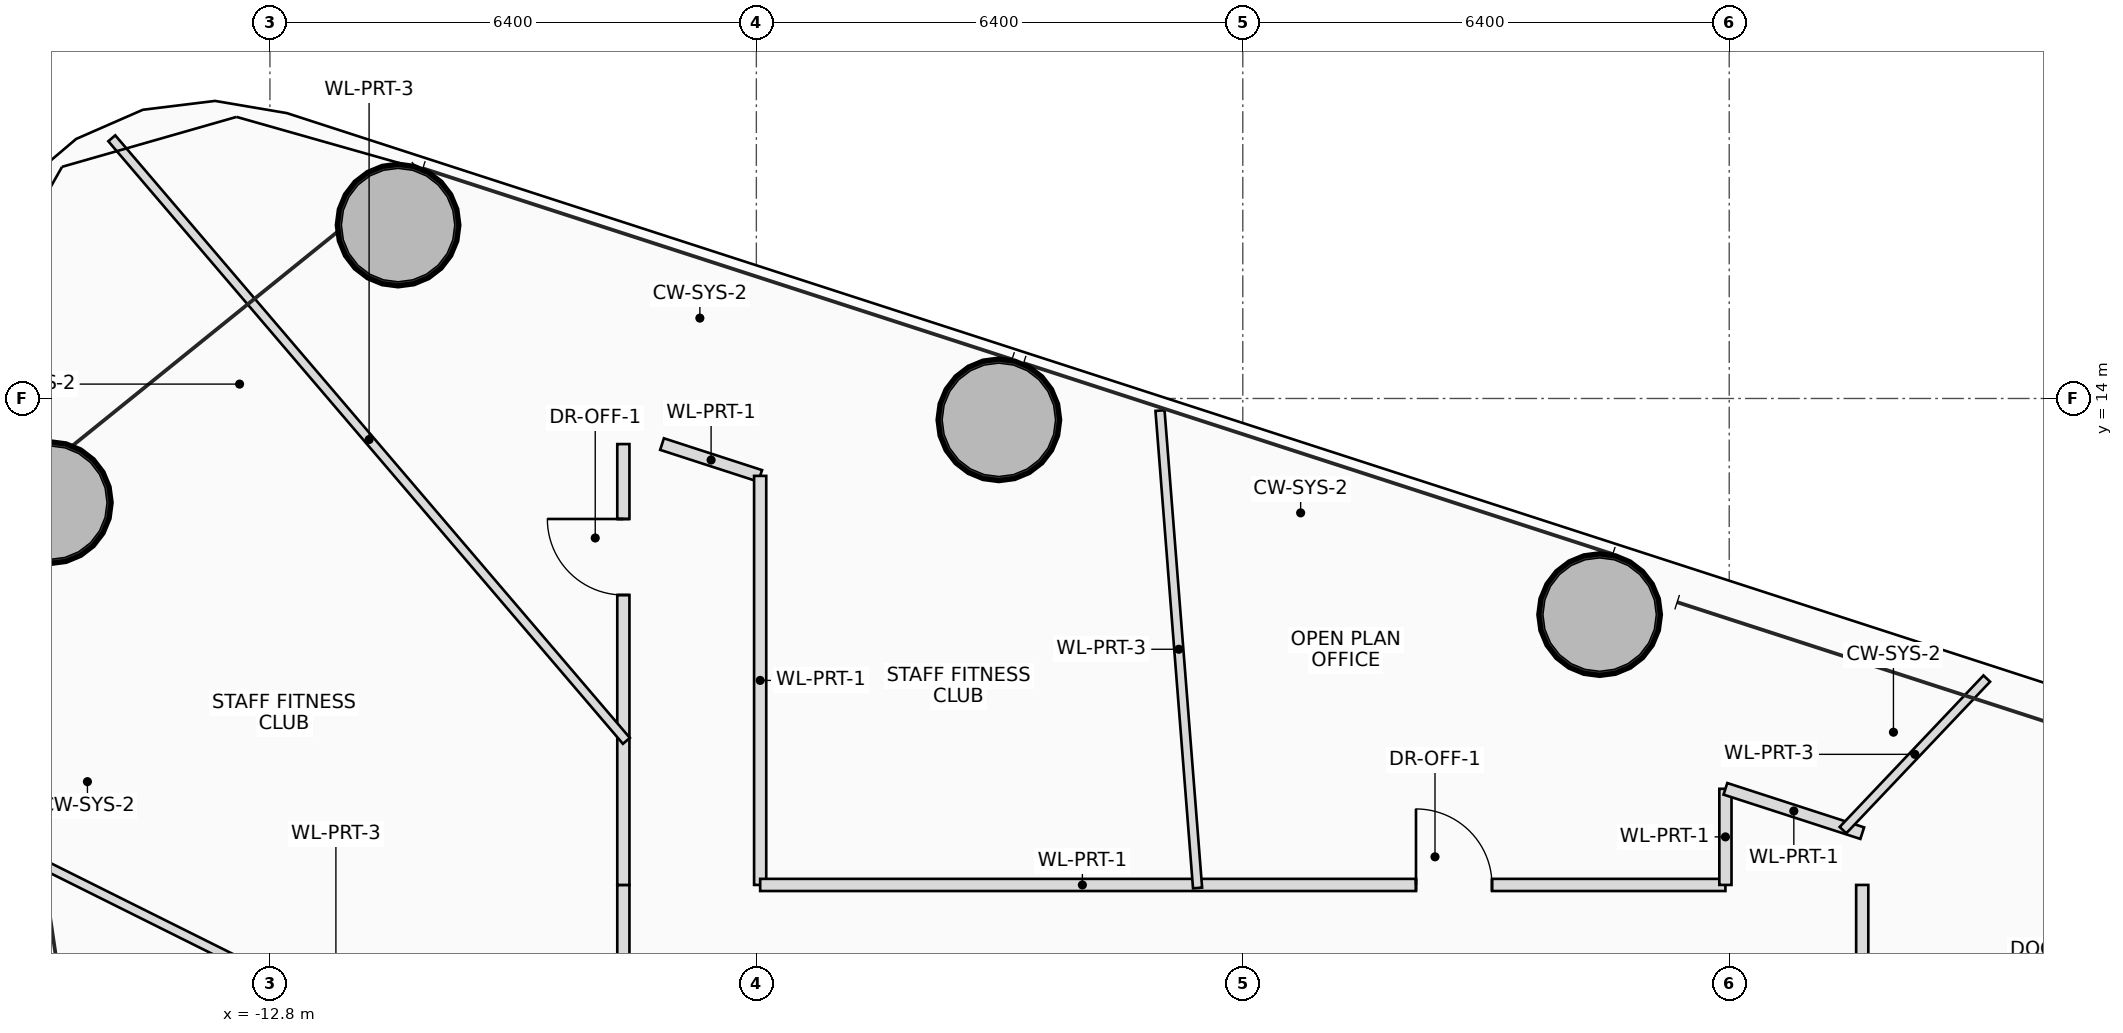
"""IFC4 building model, lengths in metres.
Left out: names, types, materials, properties, quantities, classifications, styles, units other than length and angle.
Written with IfcOpenShell. Run it as: python <this file> out.ifc"""

import sys

from ifc_helpers import new_model, si_unit, direction, frame, frame_2d, origin, origin_2d, place, context, subcontext, project, spatial, rectangle, hollow_circle, extrude, source, transform, mapped, element, fill, save


model = new_model("IFC4")
c1 = context("Model", 3, precision=1e-05, world=origin(), true_north=direction((0.0, 1.0)))
c2 = subcontext(c1, "Body", "Model", "MODEL_VIEW")
j1 = project(units=[si_unit("LENGTHUNIT", "METRE"), si_unit("PLANEANGLEUNIT", "RADIAN")], contexts=[c1])
p1 = place(None, origin())
s1 = spatial("IfcSite", under=j1, at=p1, CompositionType="ELEMENT")
p2 = place(p1, origin())
s2 = spatial("IfcBuilding", under=s1, at=p2, CompositionType="ELEMENT")
p3 = place(p2, frame((0.0, 0.0, 81.05)))
s3 = spatial("IfcBuildingStorey", under=s2, at=p3, CompositionType="ELEMENT", Elevation=81.05)
m1 = source(origin(), c2, "Body", "SweptSolid", [
    extrude(hollow_circle(Radius=0.8, WallThickness=0.055, at=origin_2d()), origin(), (0.0, 0.0, 1.0), 3.75),
])
for number, where, z_axis, x_axis in (
    (1, (4.695, 11.157, 0.0), (0.0, 0.0, 1.0), (1.0, 0.0, 0.0)),
    (2, (-3.21, 13.719, 0.0), (0.0, 0.0, 1.0), (1.0, 0.0, 0.0)),
    (3, (-11.114, 16.281, 0.0), (0.0, 0.0, 1.0), (1.0, 0.0, 0.0)),
    (4, (-15.689, 12.629, 0.0), (0.0, 0.0, 1.0), (1.0, 0.0, 0.0)),
):
    element("IfcColumn", number, at=place(p3, frame(where, z_axis=z_axis, x_axis=x_axis)), inside=s3, PredefinedType="COLUMN", context=c2, shape_type="MappedRepresentation", body=[
        mapped(m1, transform((0.0, 0.0, 0.0), scale=1.0)),
    ])
p4 = place(p3, frame((-8.15, -7.6, 0.0), z_axis=(0.0, 0.0, 1.0), x_axis=(0.0, 1.0, 0.0)))
e5 = element("IfcWall", 5, at=p4, inside=s3, PredefinedType="PARTITIONING", context=c2, shape_type="SweptSolid", body=[
    extrude(rectangle(XDim=15.2, YDim=0.16, at=frame_2d((7.6, 0.0))), origin(), (0.0, 0.0, 1.0), 2.815),
])
p5 = place(p4, frame((1.853, 0.0, 0.0)))
e6 = element("IfcOpeningElement", 6, at=p5, cuts=e5, PredefinedType="OPENING", context=c2, shape_type="SweptSolid", body=[
    extrude(rectangle(XDim=1.0, YDim=2.25, at=frame_2d((0.5, 1.125))), frame((0.0, 0.09, 0.0), z_axis=(0.0, -1.0, 0.0), x_axis=(1.0, 0.0, 0.0)), (0.0, 0.0, 1.0), 0.18),
])
p6 = place(p4, frame((7.613, 0.0, 0.0)))
e7 = element("IfcOpeningElement", 7, at=p6, cuts=e5, PredefinedType="OPENING", context=c2, shape_type="SweptSolid", body=[
    extrude(rectangle(XDim=1.0, YDim=2.25, at=frame_2d((0.5, 1.125))), frame((0.0, 0.09, 0.0), z_axis=(0.0, -1.0, 0.0), x_axis=(1.0, 0.0, 0.0)), (0.0, 0.0, 1.0), 0.18),
])
p7 = place(p4, frame((12.862, 0.0, 0.0)))
e8 = element("IfcOpeningElement", 8, at=p7, cuts=e5, PredefinedType="OPENING", context=c2, shape_type="SweptSolid", body=[
    extrude(rectangle(XDim=1.0, YDim=2.25, at=frame_2d((0.5, 1.125))), frame((0.0, 0.09, 0.0), z_axis=(0.0, -1.0, 0.0), x_axis=(1.0, 0.0, 0.0)), (0.0, 0.0, 1.0), 0.18),
])
p8 = place(p3, frame((-8.15, 7.6, 0.0), z_axis=(0.0, 0.0, 1.0), x_axis=(0.0, 1.0, 0.0)))
e9 = element("IfcWall", 9, at=p8, inside=s3, PredefinedType="PARTITIONING", context=c2, shape_type="SweptSolid", body=[
    extrude(rectangle(XDim=5.8, YDim=0.16, at=frame_2d((2.9, 0.0))), origin(), (0.0, 0.0, 1.0), 2.815),
])
p9 = place(p8, frame((3.815, 0.0, 0.0)))
e10 = element("IfcOpeningElement", 10, at=p9, cuts=e9, PredefinedType="OPENING", context=c2, shape_type="SweptSolid", body=[
    extrude(rectangle(XDim=1.0, YDim=2.25, at=frame_2d((0.5, 1.125))), frame((0.0, 0.09, 0.0), z_axis=(0.0, -1.0, 0.0), x_axis=(1.0, 0.0, 0.0)), (0.0, 0.0, 1.0), 0.18),
])
p10 = place(p3, frame((-7.641, 13.4, 0.0), z_axis=(0.0, 0.0, 1.0), x_axis=(0.951277022007, -0.308337521884, 0.0)))
e11 = element("IfcWall", 11, at=p10, inside=s3, PredefinedType="PARTITIONING", context=c2, shape_type="SweptSolid", body=[
    extrude(rectangle(XDim=1.357, YDim=0.16, at=frame_2d((0.679, 0.0))), origin(), (0.0, 0.0, 1.0), 3.51),
])
p11 = place(p3, frame((-6.35, 12.981, 0.0), z_axis=(0.0, 0.0, 1.0), x_axis=(0.0, -1.0, 0.0)))
e12 = element("IfcWall", 12, at=p11, inside=s3, PredefinedType="PARTITIONING", context=c2, shape_type="SweptSolid", body=[
    extrude(rectangle(XDim=5.381, YDim=0.16, at=frame_2d((2.691, 0.0))), origin(), (0.0, 0.0, 1.0), 3.015),
])
p12 = place(p3, frame((-6.35, 7.6, 0.0), z_axis=(0.0, 0.0, 1.0), x_axis=(1.0, 0.0, 0.0)))
e13 = element("IfcWall", 13, at=p12, inside=s3, PredefinedType="PARTITIONING", context=c2, shape_type="SweptSolid", body=[
    extrude(rectangle(XDim=12.7, YDim=0.16, at=frame_2d((6.35, 0.0))), origin(), (0.0, 0.0, 1.0), 2.815),
])
p13 = place(p12, frame((8.629, 0.0, 0.0)))
e14 = element("IfcOpeningElement", 14, at=p13, cuts=e13, PredefinedType="OPENING", context=c2, shape_type="SweptSolid", body=[
    extrude(rectangle(XDim=1.0, YDim=2.25, at=frame_2d((0.5, 1.125))), frame((0.0, 0.09, 0.0), z_axis=(0.0, -1.0, 0.0), x_axis=(1.0, 0.0, 0.0)), (0.0, 0.0, 1.0), 0.18),
])
p14 = place(p3, frame((6.35, 7.6, 0.0), z_axis=(0.0, 0.0, 1.0), x_axis=(0.0, 1.0, 0.0)))
e15 = element("IfcWall", 15, at=p14, inside=s3, PredefinedType="PARTITIONING", context=c2, shape_type="SweptSolid", body=[
    extrude(rectangle(XDim=1.265, YDim=0.16, at=frame_2d((0.632, 0.0))), origin(), (0.0, 0.0, 1.0), 3.015),
])
p15 = place(p3, frame((6.35, 8.865, 0.0), z_axis=(0.0, 0.0, 1.0), x_axis=(0.951257609277, -0.30839740724, 0.0)))
e16 = element("IfcWall", 16, at=p15, inside=s3, PredefinedType="PARTITIONING", context=c2, shape_type="SweptSolid", body=[
    extrude(rectangle(XDim=1.892, YDim=0.16, at=frame_2d((0.946, 0.0))), origin(), (0.0, 0.0, 1.0), 3.165),
])
p16 = place(p3, frame((8.15, 7.6, 0.0), z_axis=(0.0, 0.0, 1.0), x_axis=(0.0, -1.0, 0.0)))
e17 = element("IfcWall", 17, at=p16, inside=s3, PredefinedType="PARTITIONING", context=c2, shape_type="SweptSolid", body=[
    extrude(rectangle(XDim=7.58, YDim=0.16, at=frame_2d((3.79, 0.0))), origin(), (0.0, 0.0, 1.0), 2.815),
])
p17 = place(p16, frame((1.601, 0.0, 0.0)))
e18 = element("IfcOpeningElement", 18, at=p17, cuts=e17, PredefinedType="OPENING", context=c2, shape_type="SweptSolid", body=[
    extrude(rectangle(XDim=1.0, YDim=2.25, at=frame_2d((0.5, 1.125))), frame((0.0, 0.09, 0.0), z_axis=(0.0, -1.0, 0.0), x_axis=(1.0, 0.0, 0.0)), (0.0, 0.0, 1.0), 0.18),
])
p18 = place(p16, frame((5.209, 0.0, 0.0)))
e19 = element("IfcOpeningElement", 19, at=p18, cuts=e17, PredefinedType="OPENING", context=c2, shape_type="SweptSolid", body=[
    extrude(rectangle(XDim=1.0, YDim=2.25, at=frame_2d((0.5, 1.125))), frame((0.0, 0.09, 0.0), z_axis=(0.0, -1.0, 0.0), x_axis=(1.0, 0.0, 0.0)), (0.0, 0.0, 1.0), 0.18),
])
p19 = place(p3, frame((-8.11, 9.496, 0.0), z_axis=(0.0, 0.0, 1.0), x_axis=(-0.649436485197, 0.760415841297, 0.0)))
e20 = element("IfcWall", 20, at=p19, inside=s3, PredefinedType="PARTITIONING", context=c2, shape_type="SweptSolid", body=[
    extrude(rectangle(XDim=10.425, YDim=0.12, at=frame_2d((5.213, 0.0))), origin(), (0.0, 0.0, 1.0), 2.815),
])
p20 = place(p3, frame((-8.11, 4.043, 0.0), z_axis=(0.0, 0.0, 1.0), x_axis=(-0.894929683648, 0.44620719551, 0.0)))
e21 = element("IfcWall", 21, at=p20, inside=s3, PredefinedType="PARTITIONING", context=c2, shape_type="SweptSolid", body=[
    extrude(rectangle(XDim=8.542, YDim=0.12, at=frame_2d((4.271, 0.0))), origin(), (0.0, 0.0, 1.0), 2.815),
])
p21 = place(p3, frame((8.11, 3.526, 0.0), z_axis=(0.0, 0.0, 1.0), x_axis=(0.917062319349, 0.398743905823, 0.0)))
e22 = element("IfcWall", 22, at=p21, inside=s3, PredefinedType="PARTITIONING", context=c2, shape_type="SweptSolid", body=[
    extrude(rectangle(XDim=10.535, YDim=0.12, at=frame_2d((5.268, 0.0))), origin(), (0.0, 0.0, 1.0), 2.815),
])
p22 = place(p3, frame((7.897, 8.321, 0.0), z_axis=(0.0, 0.0, 1.0), x_axis=(0.688345527251, 0.725382957556, 0.0)))
e23 = element("IfcWall", 23, at=p22, inside=s3, PredefinedType="PARTITIONING", context=c2, shape_type="SweptSolid", body=[
    extrude(rectangle(XDim=2.749, YDim=0.12, at=frame_2d((1.375, 0.0))), origin(), (0.0, 0.0, 1.0), 2.975),
])
p23 = place(p3, frame((-0.595, 7.56, 0.0), z_axis=(0.0, 0.0, 1.0), x_axis=(-0.07846535306, 0.996916841251, 0.0)))
e24 = element("IfcWall", 24, at=p23, inside=s3, PredefinedType="PARTITIONING", context=c2, shape_type="SweptSolid", body=[
    extrude(rectangle(XDim=6.301, YDim=0.12, at=frame_2d((3.15, 0.0))), origin(), (0.0, 0.0, 1.0), 2.975),
])
p24 = place(p9, origin())
e25 = element("IfcDoor", 25, at=p24, inside=s3, OperationType="SINGLE_SWING_RIGHT", PredefinedType="DOOR", context=c2, shape_type="SweptSolid", body=[
    extrude(rectangle(XDim=1.0, YDim=2.25, at=frame_2d((0.5, 1.125))), frame((0.0, 0.025, 0.0), z_axis=(0.0, -1.0, 0.0), x_axis=(1.0, 0.0, 0.0)), (0.0, 0.0, 1.0), 0.05),
])
fill(e10, e25)
p25 = place(p13, origin())
e26 = element("IfcDoor", 26, at=p25, inside=s3, OperationType="SINGLE_SWING_LEFT", PredefinedType="DOOR", context=c2, shape_type="SweptSolid", body=[
    extrude(rectangle(XDim=1.0, YDim=2.25, at=frame_2d((0.5, 1.125))), frame((0.0, 0.025, 0.0), z_axis=(0.0, -1.0, 0.0), x_axis=(1.0, 0.0, 0.0)), (0.0, 0.0, 1.0), 0.05),
])
fill(e14, e26)
save(model, sys.argv[1])
